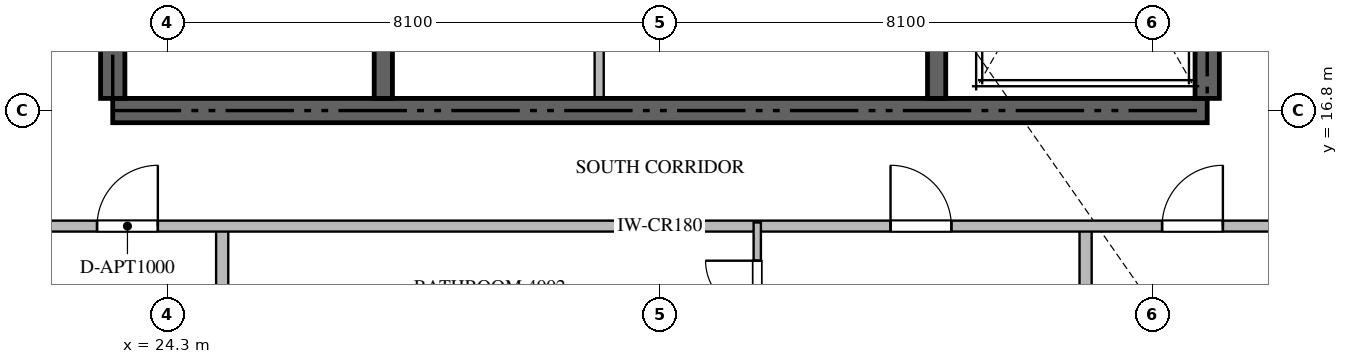
"""IFC4 building model, lengths in metres.
Left out: names, types, materials, properties, quantities, classifications, styles, units other than length and angle.
Written with IfcOpenShell. Run it as: python <this file> out.ifc"""

import sys

from ifc_helpers import new_model, si_unit, direction, frame, frame_2d, origin, place, context, subcontext, project, spatial, rectangle, extrude, source, transform, mapped, element, fill, save


model = new_model("IFC4")
c1 = context("Model", 3, precision=1e-05, world=origin(), true_north=direction((0.0, 1.0)))
c2 = subcontext(c1, "Body", "Model", "MODEL_VIEW")
j1 = project(units=[si_unit("LENGTHUNIT", "METRE"), si_unit("PLANEANGLEUNIT", "RADIAN")], contexts=[c1])
p1 = place(None, origin())
s1 = spatial("IfcSite", under=j1, at=p1, CompositionType="ELEMENT")
p2 = place(p1, origin())
s2 = spatial("IfcBuilding", under=s1, at=p2, CompositionType="ELEMENT")
p3 = place(p2, frame((0.0, 0.0, 161.4)))
s3 = spatial("IfcBuildingStorey", under=s2, at=p3, CompositionType="ELEMENT", Elevation=161.4)
p4 = place(p3, frame((23.4, 16.8, -0.26), z_axis=(0.0, 0.0, 1.0), x_axis=(1.0, 0.0, 0.0)))
e1 = element("IfcWall", 1, at=p4, inside=s3, PredefinedType="SHEAR", context=c2, shape_type="SweptSolid", body=[
    extrude(rectangle(XDim=18.0, YDim=0.4, at=frame_2d((9.0, 0.0))), origin(), (0.0, 0.0, 1.0), 3.748),
])
p5 = place(p3, frame((23.4, 17.0, -0.26), z_axis=(0.0, 0.0, 1.0), x_axis=(0.0, 1.0, 0.0)))
e2 = element("IfcWall", 2, at=p5, inside=s3, PredefinedType="SHEAR", context=c2, shape_type="SweptSolid", body=[
    extrude(rectangle(XDim=4.85, YDim=0.4, at=frame_2d((2.425, 0.0))), origin(), (0.0, 0.0, 1.0), 3.748),
])
p6 = place(p3, frame((41.4, 17.0, -0.26), z_axis=(0.0, 0.0, 1.0), x_axis=(0.0, 1.0, 0.0)))
e3 = element("IfcWall", 3, at=p6, inside=s3, PredefinedType="SHEAR", context=c2, shape_type="SweptSolid", body=[
    extrude(rectangle(XDim=8.35, YDim=0.4, at=frame_2d((4.175, 0.0))), origin(), (0.0, 0.0, 1.0), 3.748),
])
p7 = place(p3, frame((27.85, 17.0, -0.26), z_axis=(0.0, 0.0, 1.0), x_axis=(0.0, 1.0, 0.0)))
e4 = element("IfcWall", 4, at=p7, inside=s3, PredefinedType="SHEAR", context=c2, shape_type="SweptSolid", body=[
    extrude(rectangle(XDim=4.85, YDim=0.3, at=frame_2d((2.425, 0.0))), origin(), (0.0, 0.0, 1.0), 3.748),
])
p8 = place(p3, frame((36.95, 17.0, -0.26), z_axis=(0.0, 0.0, 1.0), x_axis=(0.0, 1.0, 0.0)))
e5 = element("IfcWall", 5, at=p8, inside=s3, PredefinedType="SHEAR", context=c2, shape_type="SweptSolid", body=[
    extrude(rectangle(XDim=8.35, YDim=0.3, at=frame_2d((4.175, 0.0))), origin(), (0.0, 0.0, 1.0), 3.748),
])
p9 = place(p3, frame((31.4, 17.02, 0.0), z_axis=(0.0, 0.0, 1.0), x_axis=(0.0, 1.0, 0.0)))
e6 = element("IfcWall", 6, at=p9, inside=s3, PredefinedType="PARTITIONING", context=c2, shape_type="SweptSolid", body=[
    extrude(rectangle(XDim=2.73, YDim=0.15, at=frame_2d((1.365, 0.0))), origin(), (0.0, 0.0, 1.0), 3.49),
])
for number, where, z_axis, x_axis in (
    (7, (25.2, 1.482, 0.0), (0.0, 0.0, 1.0), (0.0, 1.0, 0.0)),
    (8, (39.4, 1.482, 0.0), (0.0, 0.0, 1.0), (0.0, 1.0, 0.0)),
):
    element("IfcWall", number, at=place(p3, frame(where, z_axis=z_axis, x_axis=x_axis)), inside=s3, PredefinedType="PARTITIONING", context=c2, shape_type="SweptSolid", body=[
        extrude(rectangle(XDim=13.418, YDim=0.2, at=frame_2d((6.709, 0.0))), origin(), (0.0, 0.0, 1.0), 3.49),
    ])
p10 = place(p3, frame((20.952, 14.9, 0.0), z_axis=(0.0, 0.0, 1.0), x_axis=(1.0, 0.0, 0.0)))
e9 = element("IfcWall", 9, at=p10, inside=s3, PredefinedType="PARTITIONING", context=c2, shape_type="SweptSolid", body=[
    extrude(rectangle(XDim=22.896, YDim=0.18, at=frame_2d((11.448, 0.0))), origin(), (0.0, 0.0, 1.0), 3.49),
])
p11 = place(p10, frame((2.19, 0.0, 0.0)))
e10 = element("IfcOpeningElement", 10, at=p11, cuts=e9, PredefinedType="OPENING", context=c2, shape_type="SweptSolid", body=[
    extrude(rectangle(XDim=1.0, YDim=2.15, at=frame_2d((0.5, 1.075))), frame((0.0, 0.1, 0.0), z_axis=(0.0, -1.0, 0.0), x_axis=(1.0, 0.0, 0.0)), (0.0, 0.0, 1.0), 0.2),
])
p12 = place(p10, frame((15.24, 0.0, 0.0)))
e11 = element("IfcOpeningElement", 11, at=p12, cuts=e9, PredefinedType="OPENING", context=c2, shape_type="SweptSolid", body=[
    extrude(rectangle(XDim=1.0, YDim=2.15, at=frame_2d((0.5, 1.075))), frame((0.0, 0.1, 0.0), z_axis=(0.0, -1.0, 0.0), x_axis=(1.0, 0.0, 0.0)), (0.0, 0.0, 1.0), 0.2),
])
p13 = place(p10, frame((19.706, 0.0, 0.0)))
e12 = element("IfcOpeningElement", 12, at=p13, cuts=e9, PredefinedType="OPENING", context=c2, shape_type="SweptSolid", body=[
    extrude(rectangle(XDim=1.0, YDim=2.15, at=frame_2d((0.5, 1.075))), frame((0.0, 0.1, 0.0), z_axis=(0.0, -1.0, 0.0), x_axis=(1.0, 0.0, 0.0)), (0.0, 0.0, 1.0), 0.2),
])
p14 = place(p3, frame((34.0, 12.852, 0.0), z_axis=(0.0, 0.0, 1.0), x_axis=(0.0, 1.0, 0.0)))
e13 = element("IfcWall", 13, at=p14, inside=s3, PredefinedType="PARTITIONING", context=c2, shape_type="SweptSolid", body=[
    extrude(rectangle(XDim=2.108, YDim=0.12, at=frame_2d((1.054, 0.0))), origin(), (0.0, 0.0, 1.0), 3.49),
])
p15 = place(p14, frame((0.629, 0.0, 0.0)))
e14 = element("IfcOpeningElement", 14, at=p15, cuts=e13, PredefinedType="OPENING", context=c2, shape_type="SweptSolid", body=[
    extrude(rectangle(XDim=0.85, YDim=2.1, at=frame_2d((0.425, 1.05))), frame((0.0, 0.07, 0.0), z_axis=(0.0, -1.0, 0.0), x_axis=(1.0, 0.0, 0.0)), (0.0, 0.0, 1.0), 0.14),
])
m1 = source(origin(), c2, "Body", "SweptSolid", [
    extrude(rectangle(XDim=1.0, YDim=2.15, at=frame_2d((0.5, 1.075))), frame((0.0, 0.025, 0.0), z_axis=(0.0, -1.0, 0.0), x_axis=(1.0, 0.0, 0.0)), (0.0, 0.0, 1.0), 0.05),
])
p16 = place(p11, origin())
e15 = element("IfcDoor", 15, at=p16, inside=s3, OperationType="SINGLE_SWING_RIGHT", PredefinedType="DOOR", context=c2, shape_type="MappedRepresentation", body=[
    mapped(m1, transform((0.0, 0.0, 0.0), scale=1.0)),
])
fill(e10, e15)
p17 = place(p12, origin())
e16 = element("IfcDoor", 16, at=p17, inside=s3, OperationType="SINGLE_SWING_LEFT", PredefinedType="DOOR", context=c2, shape_type="MappedRepresentation", body=[
    mapped(m1, transform((0.0, 0.0, 0.0), scale=1.0)),
])
fill(e11, e16)
p18 = place(p13, origin())
e17 = element("IfcDoor", 17, at=p18, inside=s3, OperationType="SINGLE_SWING_RIGHT", PredefinedType="DOOR", context=c2, shape_type="MappedRepresentation", body=[
    mapped(m1, transform((0.0, 0.0, 0.0), scale=1.0)),
])
fill(e12, e17)
m2 = source(origin(), c2, "Body", "SweptSolid", [
    extrude(rectangle(XDim=0.85, YDim=2.1, at=frame_2d((0.425, 1.05))), frame((0.0, 0.025, 0.0), z_axis=(0.0, -1.0, 0.0), x_axis=(1.0, 0.0, 0.0)), (0.0, 0.0, 1.0), 0.05),
])
p19 = place(p15, origin())
e18 = element("IfcDoor", 18, at=p19, inside=s3, OperationType="SINGLE_SWING_RIGHT", PredefinedType="DOOR", context=c2, shape_type="MappedRepresentation", body=[
    mapped(m2, transform((0.0, 0.0, 0.0), scale=1.0)),
])
fill(e14, e18)
save(model, sys.argv[1])
